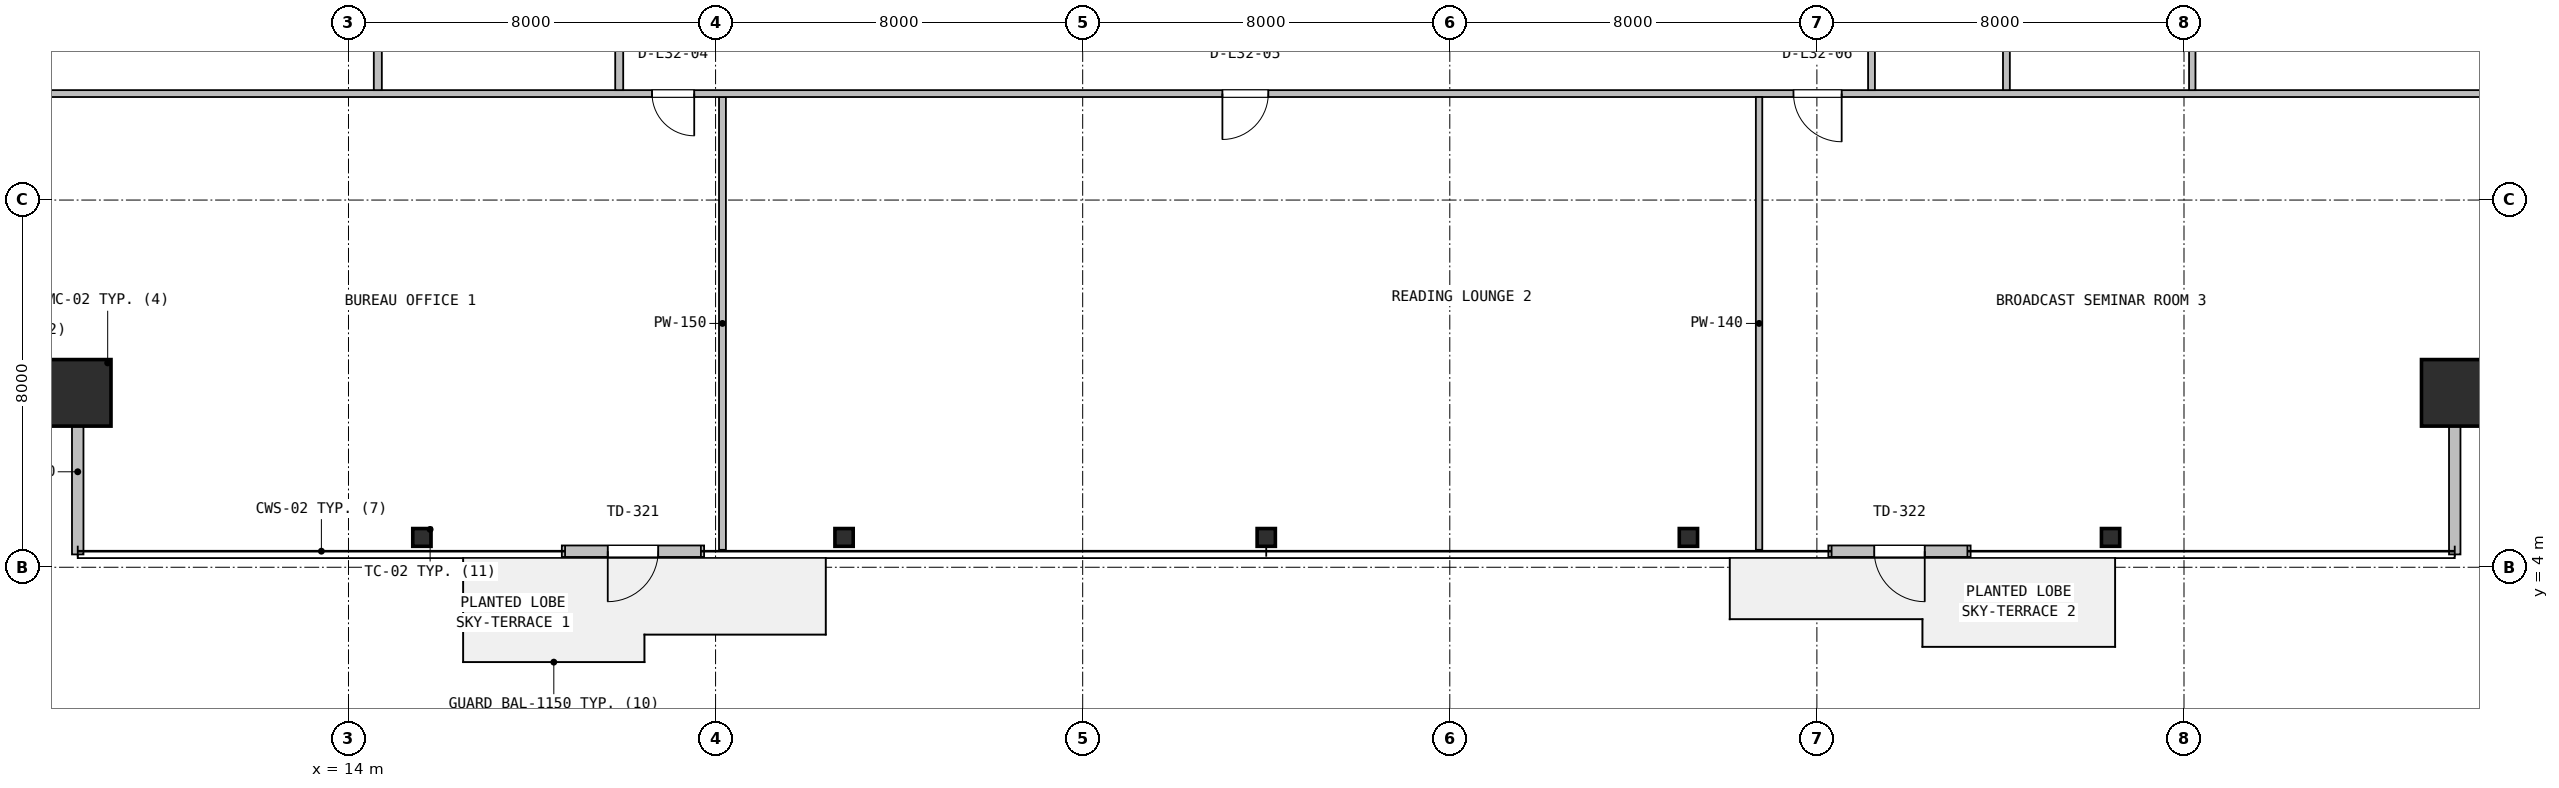
"""IFC4 building model, lengths in metres.
Left out: names, types, materials, properties, quantities, classifications, styles, units other than length and angle.
Written with IfcOpenShell. Run it as: python <this file> out.ifc"""

import sys

from ifc_helpers import new_model, si_unit, direction, frame, frame_2d, origin, origin_2d, place, context, subcontext, project, spatial, rectangle, hollow_rectangle, i_section, extrude, source, transform, mapped, element, fill, save


model = new_model("IFC4")
c1 = context("Model", 3, precision=1e-05, world=origin(), true_north=direction((0.0, 1.0)))
c2 = subcontext(c1, "Body", "Model", "MODEL_VIEW")
j1 = project(units=[si_unit("LENGTHUNIT", "METRE"), si_unit("PLANEANGLEUNIT", "RADIAN")], contexts=[c1])
p1 = place(None, origin())
s1 = spatial("IfcSite", under=j1, at=p1, CompositionType="ELEMENT")
p2 = place(p1, origin())
s2 = spatial("IfcBuilding", under=s1, at=p2, CompositionType="ELEMENT")
p3 = place(p2, frame((0.0, 0.0, 133.4)))
s3 = spatial("IfcBuildingStorey", under=s2, at=p3, CompositionType="ELEMENT", Elevation=133.4)
m1 = source(origin(), c2, "Body", "SweptSolid", [
    extrude(hollow_rectangle(XDim=1.45, YDim=1.45, WallThickness=0.055, at=origin_2d()), origin(), (0.0, 0.0, 1.0), 3.8),
])
for number, where, z_axis, x_axis in (
    (1, (8.1, 7.8, 0.0), (0.0, 0.0, 1.0), (1.0, 0.0, 0.0)),
    (2, (59.9, 7.8, 0.0), (0.0, 0.0, 1.0), (1.0, 0.0, 0.0)),
):
    element("IfcColumn", number, at=place(p3, frame(where, z_axis=z_axis, x_axis=x_axis)), inside=s3, PredefinedType="COLUMN", context=c2, shape_type="MappedRepresentation", body=[
        mapped(m1, transform((0.0, 0.0, 0.0), x_axis=(1.0, 0.0, 0.0), y_axis=(0.0, 1.0, 0.0), z_axis=(0.0, 0.0, 1.0), scale=1.0)),
    ])
m2 = source(origin(), c2, "Body", "SweptSolid", [
    extrude(i_section(OverallWidth=0.398, OverallDepth=0.387, WebThickness=0.021, FlangeThickness=0.033, FilletRadius=0.018, at=origin_2d()), origin(), (0.0, 0.0, 1.0), 3.8),
])
for number, where, z_axis, x_axis in (
    (3, (15.6, 4.65, 0.0), (0.0, 0.0, 1.0), (1.0, 0.0, 0.0)),
    (4, (24.8, 4.65, 0.0), (0.0, 0.0, 1.0), (1.0, 0.0, 0.0)),
    (5, (34.0, 4.65, 0.0), (0.0, 0.0, 1.0), (1.0, 0.0, 0.0)),
    (6, (43.2, 4.65, 0.0), (0.0, 0.0, 1.0), (1.0, 0.0, 0.0)),
    (7, (52.4, 4.65, 0.0), (0.0, 0.0, 1.0), (1.0, 0.0, 0.0)),
):
    element("IfcColumn", number, at=place(p3, frame(where, z_axis=z_axis, x_axis=x_axis)), inside=s3, PredefinedType="COLUMN", context=c2, shape_type="MappedRepresentation", body=[
        mapped(m2, transform((0.0, 0.0, 0.0), x_axis=(1.0, 0.0, 0.0), y_axis=(0.0, 1.0, 0.0), z_axis=(0.0, 0.0, 1.0), scale=1.0)),
    ])
p4 = place(p3, frame((18.65, 4.35, 0.0), z_axis=(0.0, 0.0, 1.0), x_axis=(1.0, 0.0, 0.0)))
e8 = element("IfcWall", 8, at=p4, inside=s3, PredefinedType="SOLIDWALL", context=c2, shape_type="SweptSolid", body=[
    extrude(rectangle(XDim=3.1, YDim=0.25, at=frame_2d((1.55, 0.0))), origin(), (0.0, 0.0, 1.0), 3.53),
])
p5 = place(p4, frame((1.0, 0.0, 0.0)))
e9 = element("IfcOpeningElement", 9, at=p5, cuts=e8, PredefinedType="OPENING", context=c2, shape_type="SweptSolid", body=[
    extrude(rectangle(XDim=1.1, YDim=2.15, at=frame_2d((0.55, 1.075))), frame((0.0, 0.135, 0.0), z_axis=(0.0, -1.0, 0.0), x_axis=(1.0, 0.0, 0.0)), (0.0, 0.0, 1.0), 0.27),
])
p6 = place(p3, frame((46.25, 4.35, 0.0), z_axis=(0.0, 0.0, 1.0), x_axis=(1.0, 0.0, 0.0)))
e10 = element("IfcWall", 10, at=p6, inside=s3, PredefinedType="SOLIDWALL", context=c2, shape_type="SweptSolid", body=[
    extrude(rectangle(XDim=3.1, YDim=0.25, at=frame_2d((1.55, 0.0))), origin(), (0.0, 0.0, 1.0), 3.53),
])
p7 = place(p6, frame((1.0, 0.0, 0.0)))
e11 = element("IfcOpeningElement", 11, at=p7, cuts=e10, PredefinedType="OPENING", context=c2, shape_type="SweptSolid", body=[
    extrude(rectangle(XDim=1.1, YDim=2.15, at=frame_2d((0.55, 1.075))), frame((0.0, 0.135, 0.0), z_axis=(0.0, -1.0, 0.0), x_axis=(1.0, 0.0, 0.0)), (0.0, 0.0, 1.0), 0.27),
])
for number, where, z_axis, x_axis in (
    (12, (8.1, 4.28, 0.0), (0.0, 0.0, 1.0), (0.0, 1.0, 0.0)),
    (13, (59.9, 4.28, 0.0), (0.0, 0.0, 1.0), (0.0, 1.0, 0.0)),
):
    element("IfcWall", number, at=place(p3, frame(where, z_axis=z_axis, x_axis=x_axis)), inside=s3, PredefinedType="SOLIDWALL", context=c2, shape_type="SweptSolid", body=[
        extrude(rectangle(XDim=3.6, YDim=0.25, at=frame_2d((1.8, 0.0))), origin(), (0.0, 0.0, 1.0), 3.108),
    ])
p8 = place(p3, frame((22.15, 4.38, 0.0), z_axis=(0.0, 0.0, 1.0), x_axis=(0.0, 1.0, 0.0)))
e14 = element("IfcWall", 14, at=p8, inside=s3, PredefinedType="PARTITIONING", context=c2, shape_type="SweptSolid", body=[
    extrude(rectangle(XDim=9.865, YDim=0.15, at=frame_2d((4.933, 0.0))), origin(), (0.0, 0.0, 1.0), 3.108),
])
p9 = place(p3, frame((4.68, 14.32, 0.0), z_axis=(0.0, 0.0, 1.0), x_axis=(1.0, 0.0, 0.0)))
e15 = element("IfcWall", 15, at=p9, inside=s3, PredefinedType="PARTITIONING", context=c2, shape_type="SweptSolid", body=[
    extrude(rectangle(XDim=58.64, YDim=0.15, at=frame_2d((29.32, 0.0))), origin(), (0.0, 0.0, 1.0), 2.83),
])
p10 = place(p9, frame((15.935, 0.0, 0.0)))
e16 = element("IfcOpeningElement", 16, at=p10, cuts=e15, PredefinedType="OPENING", context=c2, shape_type="SweptSolid", body=[
    extrude(rectangle(XDim=0.92, YDim=2.08, at=frame_2d((0.46, 1.04))), frame((0.0, 0.085, 0.0), z_axis=(0.0, -1.0, 0.0), x_axis=(1.0, 0.0, 0.0)), (0.0, 0.0, 1.0), 0.17),
])
p11 = place(p9, frame((28.365, 0.0, 0.0)))
e17 = element("IfcOpeningElement", 17, at=p11, cuts=e15, PredefinedType="OPENING", context=c2, shape_type="SweptSolid", body=[
    extrude(rectangle(XDim=1.0, YDim=2.1, at=frame_2d((0.5, 1.05))), frame((0.0, 0.085, 0.0), z_axis=(0.0, -1.0, 0.0), x_axis=(1.0, 0.0, 0.0)), (0.0, 0.0, 1.0), 0.17),
])
p12 = place(p9, frame((40.81, 0.0, 0.0)))
e18 = element("IfcOpeningElement", 18, at=p12, cuts=e15, PredefinedType="OPENING", context=c2, shape_type="SweptSolid", body=[
    extrude(rectangle(XDim=1.05, YDim=2.1, at=frame_2d((0.525, 1.05))), frame((0.0, 0.085, 0.0), z_axis=(0.0, -1.0, 0.0), x_axis=(1.0, 0.0, 0.0)), (0.0, 0.0, 1.0), 0.17),
])
p13 = place(p3, frame((44.74, 4.38, 0.0), z_axis=(0.0, 0.0, 1.0), x_axis=(0.0, 1.0, 0.0)))
e19 = element("IfcWall", 19, at=p13, inside=s3, PredefinedType="PARTITIONING", context=c2, shape_type="SweptSolid", body=[
    extrude(rectangle(XDim=9.865, YDim=0.14, at=frame_2d((4.933, 0.0))), origin(), (0.0, 0.0, 1.0), 3.108),
])
p14 = place(p3, frame((14.64, 14.395, 0.0), z_axis=(0.0, 0.0, 1.0), x_axis=(0.0, 1.0, 0.0)))
e20 = element("IfcWall", 20, at=p14, inside=s3, PredefinedType="PARTITIONING", context=c2, shape_type="SweptSolid", body=[
    extrude(rectangle(XDim=18.868, YDim=0.175, at=frame_2d((9.434, 0.0))), origin(), (0.0, 0.0, 1.0), 3.222),
])
p15 = place(p3, frame((19.9, 14.395, 0.0), z_axis=(0.0, 0.0, 1.0), x_axis=(0.0, 1.0, 0.0)))
e21 = element("IfcWall", 21, at=p15, inside=s3, PredefinedType="PARTITIONING", context=c2, shape_type="SweptSolid", body=[
    extrude(rectangle(XDim=18.868, YDim=0.175, at=frame_2d((9.434, 0.0))), origin(), (0.0, 0.0, 1.0), 3.222),
])
p16 = place(p15, frame((8.915, 0.0, 0.0)))
e22 = element("IfcOpeningElement", 22, at=p16, cuts=e21, PredefinedType="OPENING", context=c2, shape_type="SweptSolid", body=[
    extrude(rectangle(XDim=1.05, YDim=2.1, at=frame_2d((0.525, 1.05))), frame((0.0, 0.098, 0.0), z_axis=(0.0, -1.0, 0.0), x_axis=(1.0, 0.0, 0.0)), (0.0, 0.0, 1.0), 0.195),
])
p17 = place(p3, frame((50.13, 14.395, 0.0), z_axis=(0.0, 0.0, 1.0), x_axis=(0.0, 1.0, 0.0)))
e23 = element("IfcWall", 23, at=p17, inside=s3, PredefinedType="PARTITIONING", context=c2, shape_type="SweptSolid", body=[
    extrude(rectangle(XDim=18.88, YDim=0.15, at=frame_2d((9.44, 0.0))), origin(), (0.0, 0.0, 1.0), 3.222),
])
p18 = place(p3, frame((47.19, 14.395, 0.0), z_axis=(0.0, 0.0, 1.0), x_axis=(0.0, 1.0, 0.0)))
e24 = element("IfcWall", 24, at=p18, inside=s3, PredefinedType="PARTITIONING", context=c2, shape_type="SweptSolid", body=[
    extrude(rectangle(XDim=18.88, YDim=0.15, at=frame_2d((9.44, 0.0))), origin(), (0.0, 0.0, 1.0), 3.222),
])
p19 = place(p18, frame((8.98, 0.0, 0.0)))
e25 = element("IfcOpeningElement", 25, at=p19, cuts=e24, PredefinedType="OPENING", context=c2, shape_type="SweptSolid", body=[
    extrude(rectangle(XDim=0.92, YDim=2.08, at=frame_2d((0.46, 1.04))), frame((0.0, 0.085, 0.0), z_axis=(0.0, -1.0, 0.0), x_axis=(1.0, 0.0, 0.0)), (0.0, 0.0, 1.0), 0.17),
])
p20 = place(p3, frame((54.18, 14.395, 0.0), z_axis=(0.0, 0.0, 1.0), x_axis=(0.0, 1.0, 0.0)))
e26 = element("IfcWall", 26, at=p20, inside=s3, PredefinedType="PARTITIONING", context=c2, shape_type="SweptSolid", body=[
    extrude(rectangle(XDim=18.88, YDim=0.14, at=frame_2d((9.44, 0.0))), origin(), (0.0, 0.0, 1.0), 3.222),
])
m3 = source(origin(), c2, "Body", "SweptSolid", [
    extrude(rectangle(XDim=1.1, YDim=2.15, at=frame_2d((0.55, 1.075))), frame((0.0, 0.025, 0.0), z_axis=(0.0, -1.0, 0.0), x_axis=(1.0, 0.0, 0.0)), (0.0, 0.0, 1.0), 0.05),
])
p21 = place(p5, frame((1.1, 0.0, 0.0), z_axis=(0.0, 0.0, 1.0), x_axis=(-1.0, 0.0, 0.0)))
e27 = element("IfcDoor", 27, at=p21, inside=s3, OperationType="SINGLE_SWING_LEFT", PredefinedType="DOOR", context=c2, shape_type="MappedRepresentation", body=[
    mapped(m3, transform((0.0, 0.0, 0.0), x_axis=(1.0, 0.0, 0.0), y_axis=(0.0, 1.0, 0.0), z_axis=(0.0, 0.0, 1.0), scale=1.0)),
])
fill(e9, e27)
p22 = place(p7, frame((1.1, 0.0, 0.0), z_axis=(0.0, 0.0, 1.0), x_axis=(-1.0, 0.0, 0.0)))
e28 = element("IfcDoor", 28, at=p22, inside=s3, OperationType="SINGLE_SWING_RIGHT", PredefinedType="DOOR", context=c2, shape_type="MappedRepresentation", body=[
    mapped(m3, transform((0.0, 0.0, 0.0), x_axis=(1.0, 0.0, 0.0), y_axis=(0.0, 1.0, 0.0), z_axis=(0.0, 0.0, 1.0), scale=1.0)),
])
fill(e11, e28)
m4 = source(origin(), c2, "Body", "SweptSolid", [
    extrude(rectangle(XDim=0.92, YDim=2.08, at=frame_2d((0.46, 1.04))), frame((0.0, 0.025, 0.0), z_axis=(0.0, -1.0, 0.0), x_axis=(1.0, 0.0, 0.0)), (0.0, 0.0, 1.0), 0.05),
])
p23 = place(p10, frame((0.92, 0.0, 0.0), z_axis=(0.0, 0.0, 1.0), x_axis=(-1.0, 0.0, 0.0)))
e29 = element("IfcDoor", 29, at=p23, inside=s3, OperationType="SINGLE_SWING_RIGHT", PredefinedType="DOOR", context=c2, shape_type="MappedRepresentation", body=[
    mapped(m4, transform((0.0, 0.0, 0.0), x_axis=(1.0, 0.0, 0.0), y_axis=(0.0, 1.0, 0.0), z_axis=(0.0, 0.0, 1.0), scale=1.0)),
])
fill(e16, e29)
m5 = source(origin(), c2, "Body", "SweptSolid", [
    extrude(rectangle(XDim=1.0, YDim=2.1, at=frame_2d((0.5, 1.05))), frame((0.0, 0.025, 0.0), z_axis=(0.0, -1.0, 0.0), x_axis=(1.0, 0.0, 0.0)), (0.0, 0.0, 1.0), 0.05),
])
p24 = place(p11, frame((1.0, 0.0, 0.0), z_axis=(0.0, 0.0, 1.0), x_axis=(-1.0, 0.0, 0.0)))
e30 = element("IfcDoor", 30, at=p24, inside=s3, OperationType="SINGLE_SWING_LEFT", PredefinedType="DOOR", context=c2, shape_type="MappedRepresentation", body=[
    mapped(m5, transform((0.0, 0.0, 0.0), x_axis=(1.0, 0.0, 0.0), y_axis=(0.0, 1.0, 0.0), z_axis=(0.0, 0.0, 1.0), scale=1.0)),
])
fill(e17, e30)
m6 = source(origin(), c2, "Body", "SweptSolid", [
    extrude(rectangle(XDim=1.05, YDim=2.1, at=frame_2d((0.525, 1.05))), frame((0.0, 0.025, 0.0), z_axis=(0.0, -1.0, 0.0), x_axis=(1.0, 0.0, 0.0)), (0.0, 0.0, 1.0), 0.05),
])
p25 = place(p12, frame((1.05, 0.0, 0.0), z_axis=(0.0, 0.0, 1.0), x_axis=(-1.0, 0.0, 0.0)))
e31 = element("IfcDoor", 31, at=p25, inside=s3, OperationType="SINGLE_SWING_RIGHT", PredefinedType="DOOR", context=c2, shape_type="MappedRepresentation", body=[
    mapped(m6, transform((0.0, 0.0, 0.0), x_axis=(1.0, 0.0, 0.0), y_axis=(0.0, 1.0, 0.0), z_axis=(0.0, 0.0, 1.0), scale=1.0)),
])
fill(e18, e31)
save(model, sys.argv[1])
